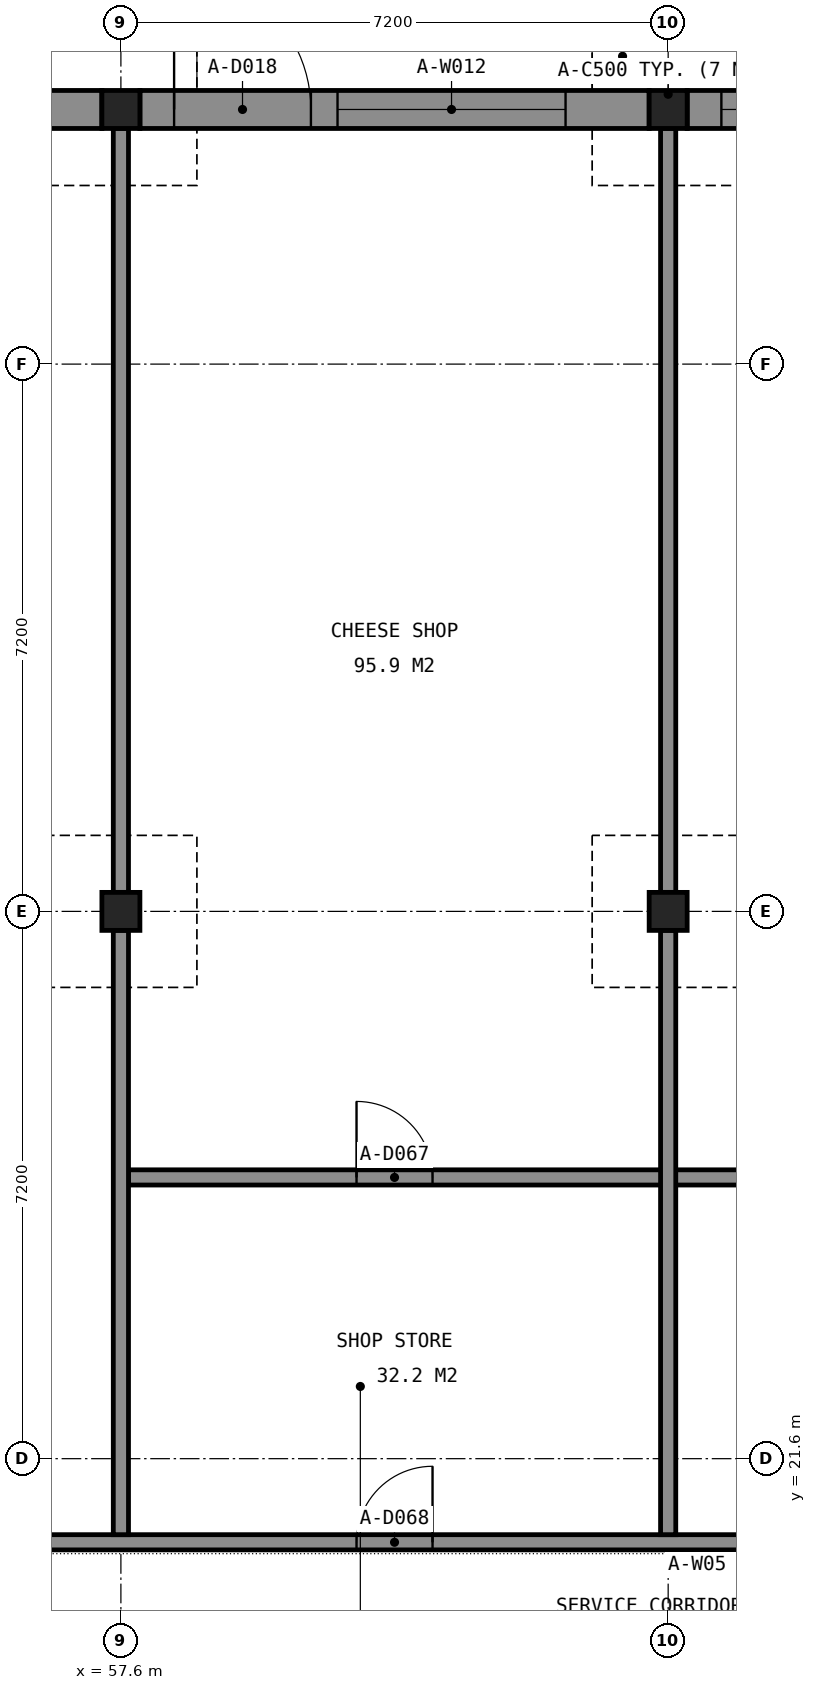
"""IFC4 building model, lengths in metres.
Left out: names, types, materials, properties, quantities, classifications, styles, units other than length and angle.
Written with IfcOpenShell. Run it as: python <this file> out.ifc"""

import sys

from ifc_helpers import new_model, si_unit, direction, frame, frame_2d, origin, origin_2d, place, context, subcontext, project, spatial, rectangle, extrude, element, fill, save


model = new_model("IFC4")
c1 = context("Model", 3, precision=1e-05, world=origin(), true_north=direction((0.0, 1.0)))
c2 = subcontext(c1, "Body", "Model", "MODEL_VIEW")
j1 = project(units=[si_unit("LENGTHUNIT", "METRE"), si_unit("PLANEANGLEUNIT", "RADIAN")], contexts=[c1])
p1 = place(None, origin())
s1 = spatial("IfcSite", under=j1, at=p1, CompositionType="ELEMENT")
p2 = place(p1, origin())
s2 = spatial("IfcBuilding", under=s1, at=p2, CompositionType="ELEMENT")
p3 = place(p2, origin())
s3 = spatial("IfcBuildingStorey", under=s2, at=p3, CompositionType="ELEMENT", Elevation=0.0)
for number, where, z_axis, x_axis in (
    (1, (57.6, 39.35, 0.0), (0.0, 0.0, 1.0), (1.0, 0.0, 0.0)),
    (2, (64.8, 39.35, 0.0), (0.0, 0.0, 1.0), (1.0, 0.0, 0.0)),
    (3, (57.6, 28.8, 0.0), (0.0, 0.0, 1.0), (1.0, 0.0, 0.0)),
    (4, (64.8, 28.8, 0.0), (0.0, 0.0, 1.0), (1.0, 0.0, 0.0)),
):
    element("IfcColumn", number, at=place(p3, frame(where, z_axis=z_axis, x_axis=x_axis)), inside=s3, PredefinedType="COLUMN", context=c2, shape_type="SweptSolid", body=[
        extrude(rectangle(XDim=0.5, YDim=0.5, at=origin_2d()), origin(), (0.0, 0.0, 1.0), 3.7),
    ])
p4 = place(p3, frame((50.9, 39.35, 0.0), z_axis=(0.0, 0.0, 1.0), x_axis=(1.0, 0.0, 0.0)))
e5 = element("IfcWall", 5, at=p4, inside=s3, PredefinedType="SOLIDWALL", context=c2, shape_type="SweptSolid", body=[
    extrude(rectangle(XDim=6.45, YDim=0.5, at=frame_2d((3.225, 0.0))), origin(), (0.0, 0.0, 1.0), 3.6),
])
p5 = place(p4, frame((0.8, 0.0, 0.0)))
e6 = element("IfcOpeningElement", 6, at=p5, cuts=e5, PredefinedType="OPENING", context=c2, shape_type="SweptSolid", body=[
    extrude(rectangle(XDim=1.2, YDim=2.1, at=frame_2d((0.6, 1.05))), frame((0.0, 0.26, 0.0), z_axis=(0.0, -1.0, 0.0), x_axis=(1.0, 0.0, 0.0)), (0.0, 0.0, 1.0), 0.52),
])
p6 = place(p3, frame((57.85, 39.35, 0.0), z_axis=(0.0, 0.0, 1.0), x_axis=(1.0, 0.0, 0.0)))
e7 = element("IfcWall", 7, at=p6, inside=s3, PredefinedType="SOLIDWALL", context=c2, shape_type="SweptSolid", body=[
    extrude(rectangle(XDim=6.7, YDim=0.5, at=frame_2d((3.35, 0.0))), origin(), (0.0, 0.0, 1.0), 3.6),
])
p7 = place(p6, frame((0.45, 0.0, 0.0)))
e8 = element("IfcOpeningElement", 8, at=p7, cuts=e7, PredefinedType="OPENING", context=c2, shape_type="SweptSolid", body=[
    extrude(rectangle(XDim=1.8, YDim=2.4, at=frame_2d((0.9, 1.2))), frame((0.0, 0.26, 0.0), z_axis=(0.0, -1.0, 0.0), x_axis=(1.0, 0.0, 0.0)), (0.0, 0.0, 1.0), 0.52),
])
p8 = place(p6, frame((2.6, 0.0, 0.6)))
e9 = element("IfcOpeningElement", 9, at=p8, cuts=e7, PredefinedType="OPENING", context=c2, shape_type="SweptSolid", body=[
    extrude(rectangle(XDim=3.0, YDim=2.4, at=frame_2d((1.5, 1.2))), frame((0.0, 0.26, 0.0), z_axis=(0.0, -1.0, 0.0), x_axis=(1.0, 0.0, 0.0)), (0.0, 0.0, 1.0), 0.52),
])
p9 = place(p3, frame((65.05, 39.35, 0.0), z_axis=(0.0, 0.0, 1.0), x_axis=(1.0, 0.0, 0.0)))
e10 = element("IfcWall", 10, at=p9, inside=s3, PredefinedType="SOLIDWALL", context=c2, shape_type="SweptSolid", body=[
    extrude(rectangle(XDim=6.7, YDim=0.5, at=frame_2d((3.35, 0.0))), origin(), (0.0, 0.0, 1.0), 3.6),
])
p10 = place(p9, frame((4.45, 0.0, 0.0)))
e11 = element("IfcOpeningElement", 11, at=p10, cuts=e10, PredefinedType="OPENING", context=c2, shape_type="SweptSolid", body=[
    extrude(rectangle(XDim=1.8, YDim=2.4, at=frame_2d((0.9, 1.2))), frame((0.0, 0.26, 0.0), z_axis=(0.0, -1.0, 0.0), x_axis=(1.0, 0.0, 0.0)), (0.0, 0.0, 1.0), 0.52),
])
p11 = place(p9, frame((0.45, 0.0, 0.6)))
e12 = element("IfcOpeningElement", 12, at=p11, cuts=e10, PredefinedType="OPENING", context=c2, shape_type="SweptSolid", body=[
    extrude(rectangle(XDim=3.0, YDim=2.4, at=frame_2d((1.5, 1.2))), frame((0.0, 0.26, 0.0), z_axis=(0.0, -1.0, 0.0), x_axis=(1.0, 0.0, 0.0)), (0.0, 0.0, 1.0), 0.52),
])
p12 = place(p3, frame((54.35, 20.5, 0.0), z_axis=(0.0, 0.0, 1.0), x_axis=(1.0, 0.0, 0.0)))
e13 = element("IfcWall", 13, at=p12, inside=s3, PredefinedType="PARTITIONING", context=c2, shape_type="SweptSolid", body=[
    extrude(rectangle(XDim=92.9, YDim=0.2, at=frame_2d((46.45, 0.0))), origin(), (0.0, 0.0, 1.0), 3.5),
])
p13 = place(p12, frame((1.1, 0.0, 0.0)))
e14 = element("IfcOpeningElement", 14, at=p13, cuts=e13, PredefinedType="OPENING", context=c2, shape_type="SweptSolid", body=[
    extrude(rectangle(XDim=0.9, YDim=2.1, at=frame_2d((0.45, 1.05))), frame((0.0, 0.11, 0.0), z_axis=(0.0, -1.0, 0.0), x_axis=(1.0, 0.0, 0.0)), (0.0, 0.0, 1.0), 0.22),
])
p14 = place(p12, frame((90.9, 0.0, 0.0)))
e15 = element("IfcOpeningElement", 15, at=p14, cuts=e13, PredefinedType="OPENING", context=c2, shape_type="SweptSolid", body=[
    extrude(rectangle(XDim=0.9, YDim=2.1, at=frame_2d((0.45, 1.05))), frame((0.0, 0.11, 0.0), z_axis=(0.0, -1.0, 0.0), x_axis=(1.0, 0.0, 0.0)), (0.0, 0.0, 1.0), 0.22),
])
p15 = place(p12, frame((6.35, 0.0, 0.0)))
e16 = element("IfcOpeningElement", 16, at=p15, cuts=e13, PredefinedType="OPENING", context=c2, shape_type="SweptSolid", body=[
    extrude(rectangle(XDim=1.0, YDim=2.1, at=frame_2d((0.5, 1.05))), frame((0.0, 0.11, 0.0), z_axis=(0.0, -1.0, 0.0), x_axis=(1.0, 0.0, 0.0)), (0.0, 0.0, 1.0), 0.22),
])
p16 = place(p12, frame((13.55, 0.0, 0.0)))
e17 = element("IfcOpeningElement", 17, at=p16, cuts=e13, PredefinedType="OPENING", context=c2, shape_type="SweptSolid", body=[
    extrude(rectangle(XDim=1.0, YDim=2.1, at=frame_2d((0.5, 1.05))), frame((0.0, 0.11, 0.0), z_axis=(0.0, -1.0, 0.0), x_axis=(1.0, 0.0, 0.0)), (0.0, 0.0, 1.0), 0.22),
])
p17 = place(p12, frame((20.75, 0.0, 0.0)))
e18 = element("IfcOpeningElement", 18, at=p17, cuts=e13, PredefinedType="OPENING", context=c2, shape_type="SweptSolid", body=[
    extrude(rectangle(XDim=1.0, YDim=2.1, at=frame_2d((0.5, 1.05))), frame((0.0, 0.11, 0.0), z_axis=(0.0, -1.0, 0.0), x_axis=(1.0, 0.0, 0.0)), (0.0, 0.0, 1.0), 0.22),
])
p18 = place(p12, frame((27.95, 0.0, 0.0)))
e19 = element("IfcOpeningElement", 19, at=p18, cuts=e13, PredefinedType="OPENING", context=c2, shape_type="SweptSolid", body=[
    extrude(rectangle(XDim=1.0, YDim=2.1, at=frame_2d((0.5, 1.05))), frame((0.0, 0.11, 0.0), z_axis=(0.0, -1.0, 0.0), x_axis=(1.0, 0.0, 0.0)), (0.0, 0.0, 1.0), 0.22),
])
p19 = place(p12, frame((35.15, 0.0, 0.0)))
e20 = element("IfcOpeningElement", 20, at=p19, cuts=e13, PredefinedType="OPENING", context=c2, shape_type="SweptSolid", body=[
    extrude(rectangle(XDim=1.0, YDim=2.1, at=frame_2d((0.5, 1.05))), frame((0.0, 0.11, 0.0), z_axis=(0.0, -1.0, 0.0), x_axis=(1.0, 0.0, 0.0)), (0.0, 0.0, 1.0), 0.22),
])
p20 = place(p12, frame((42.35, 0.0, 0.0)))
e21 = element("IfcOpeningElement", 21, at=p20, cuts=e13, PredefinedType="OPENING", context=c2, shape_type="SweptSolid", body=[
    extrude(rectangle(XDim=1.0, YDim=2.1, at=frame_2d((0.5, 1.05))), frame((0.0, 0.11, 0.0), z_axis=(0.0, -1.0, 0.0), x_axis=(1.0, 0.0, 0.0)), (0.0, 0.0, 1.0), 0.22),
])
p21 = place(p12, frame((49.55, 0.0, 0.0)))
e22 = element("IfcOpeningElement", 22, at=p21, cuts=e13, PredefinedType="OPENING", context=c2, shape_type="SweptSolid", body=[
    extrude(rectangle(XDim=1.0, YDim=2.1, at=frame_2d((0.5, 1.05))), frame((0.0, 0.11, 0.0), z_axis=(0.0, -1.0, 0.0), x_axis=(1.0, 0.0, 0.0)), (0.0, 0.0, 1.0), 0.22),
])
p22 = place(p12, frame((56.75, 0.0, 0.0)))
e23 = element("IfcOpeningElement", 23, at=p22, cuts=e13, PredefinedType="OPENING", context=c2, shape_type="SweptSolid", body=[
    extrude(rectangle(XDim=1.0, YDim=2.1, at=frame_2d((0.5, 1.05))), frame((0.0, 0.11, 0.0), z_axis=(0.0, -1.0, 0.0), x_axis=(1.0, 0.0, 0.0)), (0.0, 0.0, 1.0), 0.22),
])
p23 = place(p12, frame((63.95, 0.0, 0.0)))
e24 = element("IfcOpeningElement", 24, at=p23, cuts=e13, PredefinedType="OPENING", context=c2, shape_type="SweptSolid", body=[
    extrude(rectangle(XDim=1.0, YDim=2.1, at=frame_2d((0.5, 1.05))), frame((0.0, 0.11, 0.0), z_axis=(0.0, -1.0, 0.0), x_axis=(1.0, 0.0, 0.0)), (0.0, 0.0, 1.0), 0.22),
])
p24 = place(p12, frame((71.15, 0.0, 0.0)))
e25 = element("IfcOpeningElement", 25, at=p24, cuts=e13, PredefinedType="OPENING", context=c2, shape_type="SweptSolid", body=[
    extrude(rectangle(XDim=1.0, YDim=2.1, at=frame_2d((0.5, 1.05))), frame((0.0, 0.11, 0.0), z_axis=(0.0, -1.0, 0.0), x_axis=(1.0, 0.0, 0.0)), (0.0, 0.0, 1.0), 0.22),
])
p25 = place(p12, frame((78.35, 0.0, 0.0)))
e26 = element("IfcOpeningElement", 26, at=p25, cuts=e13, PredefinedType="OPENING", context=c2, shape_type="SweptSolid", body=[
    extrude(rectangle(XDim=1.0, YDim=2.1, at=frame_2d((0.5, 1.05))), frame((0.0, 0.11, 0.0), z_axis=(0.0, -1.0, 0.0), x_axis=(1.0, 0.0, 0.0)), (0.0, 0.0, 1.0), 0.22),
])
p26 = place(p12, frame((85.55, 0.0, 0.0)))
e27 = element("IfcOpeningElement", 27, at=p26, cuts=e13, PredefinedType="OPENING", context=c2, shape_type="SweptSolid", body=[
    extrude(rectangle(XDim=1.0, YDim=2.1, at=frame_2d((0.5, 1.05))), frame((0.0, 0.11, 0.0), z_axis=(0.0, -1.0, 0.0), x_axis=(1.0, 0.0, 0.0)), (0.0, 0.0, 1.0), 0.22),
])
p27 = place(p3, frame((57.7, 25.3, 0.0), z_axis=(0.0, 0.0, 1.0), x_axis=(1.0, 0.0, 0.0)))
e28 = element("IfcWall", 28, at=p27, inside=s3, PredefinedType="PARTITIONING", context=c2, shape_type="SweptSolid", body=[
    extrude(rectangle(XDim=86.2, YDim=0.2, at=frame_2d((43.1, 0.0))), origin(), (0.0, 0.0, 1.0), 3.5),
])
p28 = place(p27, frame((3.0, 0.0, 0.0)))
e29 = element("IfcOpeningElement", 29, at=p28, cuts=e28, PredefinedType="OPENING", context=c2, shape_type="SweptSolid", body=[
    extrude(rectangle(XDim=1.0, YDim=2.1, at=frame_2d((0.5, 1.05))), frame((0.0, 0.11, 0.0), z_axis=(0.0, -1.0, 0.0), x_axis=(1.0, 0.0, 0.0)), (0.0, 0.0, 1.0), 0.22),
])
p29 = place(p27, frame((10.2, 0.0, 0.0)))
e30 = element("IfcOpeningElement", 30, at=p29, cuts=e28, PredefinedType="OPENING", context=c2, shape_type="SweptSolid", body=[
    extrude(rectangle(XDim=1.0, YDim=2.1, at=frame_2d((0.5, 1.05))), frame((0.0, 0.11, 0.0), z_axis=(0.0, -1.0, 0.0), x_axis=(1.0, 0.0, 0.0)), (0.0, 0.0, 1.0), 0.22),
])
p30 = place(p27, frame((17.4, 0.0, 0.0)))
e31 = element("IfcOpeningElement", 31, at=p30, cuts=e28, PredefinedType="OPENING", context=c2, shape_type="SweptSolid", body=[
    extrude(rectangle(XDim=1.0, YDim=2.1, at=frame_2d((0.5, 1.05))), frame((0.0, 0.11, 0.0), z_axis=(0.0, -1.0, 0.0), x_axis=(1.0, 0.0, 0.0)), (0.0, 0.0, 1.0), 0.22),
])
p31 = place(p27, frame((24.6, 0.0, 0.0)))
e32 = element("IfcOpeningElement", 32, at=p31, cuts=e28, PredefinedType="OPENING", context=c2, shape_type="SweptSolid", body=[
    extrude(rectangle(XDim=1.0, YDim=2.1, at=frame_2d((0.5, 1.05))), frame((0.0, 0.11, 0.0), z_axis=(0.0, -1.0, 0.0), x_axis=(1.0, 0.0, 0.0)), (0.0, 0.0, 1.0), 0.22),
])
p32 = place(p27, frame((31.8, 0.0, 0.0)))
e33 = element("IfcOpeningElement", 33, at=p32, cuts=e28, PredefinedType="OPENING", context=c2, shape_type="SweptSolid", body=[
    extrude(rectangle(XDim=1.0, YDim=2.1, at=frame_2d((0.5, 1.05))), frame((0.0, 0.11, 0.0), z_axis=(0.0, -1.0, 0.0), x_axis=(1.0, 0.0, 0.0)), (0.0, 0.0, 1.0), 0.22),
])
p33 = place(p27, frame((39.0, 0.0, 0.0)))
e34 = element("IfcOpeningElement", 34, at=p33, cuts=e28, PredefinedType="OPENING", context=c2, shape_type="SweptSolid", body=[
    extrude(rectangle(XDim=1.0, YDim=2.1, at=frame_2d((0.5, 1.05))), frame((0.0, 0.11, 0.0), z_axis=(0.0, -1.0, 0.0), x_axis=(1.0, 0.0, 0.0)), (0.0, 0.0, 1.0), 0.22),
])
p34 = place(p27, frame((46.2, 0.0, 0.0)))
e35 = element("IfcOpeningElement", 35, at=p34, cuts=e28, PredefinedType="OPENING", context=c2, shape_type="SweptSolid", body=[
    extrude(rectangle(XDim=1.0, YDim=2.1, at=frame_2d((0.5, 1.05))), frame((0.0, 0.11, 0.0), z_axis=(0.0, -1.0, 0.0), x_axis=(1.0, 0.0, 0.0)), (0.0, 0.0, 1.0), 0.22),
])
p35 = place(p27, frame((53.4, 0.0, 0.0)))
e36 = element("IfcOpeningElement", 36, at=p35, cuts=e28, PredefinedType="OPENING", context=c2, shape_type="SweptSolid", body=[
    extrude(rectangle(XDim=1.0, YDim=2.1, at=frame_2d((0.5, 1.05))), frame((0.0, 0.11, 0.0), z_axis=(0.0, -1.0, 0.0), x_axis=(1.0, 0.0, 0.0)), (0.0, 0.0, 1.0), 0.22),
])
p36 = place(p27, frame((60.6, 0.0, 0.0)))
e37 = element("IfcOpeningElement", 37, at=p36, cuts=e28, PredefinedType="OPENING", context=c2, shape_type="SweptSolid", body=[
    extrude(rectangle(XDim=1.0, YDim=2.1, at=frame_2d((0.5, 1.05))), frame((0.0, 0.11, 0.0), z_axis=(0.0, -1.0, 0.0), x_axis=(1.0, 0.0, 0.0)), (0.0, 0.0, 1.0), 0.22),
])
p37 = place(p27, frame((67.8, 0.0, 0.0)))
e38 = element("IfcOpeningElement", 38, at=p37, cuts=e28, PredefinedType="OPENING", context=c2, shape_type="SweptSolid", body=[
    extrude(rectangle(XDim=1.0, YDim=2.1, at=frame_2d((0.5, 1.05))), frame((0.0, 0.11, 0.0), z_axis=(0.0, -1.0, 0.0), x_axis=(1.0, 0.0, 0.0)), (0.0, 0.0, 1.0), 0.22),
])
p38 = place(p27, frame((75.0, 0.0, 0.0)))
e39 = element("IfcOpeningElement", 39, at=p38, cuts=e28, PredefinedType="OPENING", context=c2, shape_type="SweptSolid", body=[
    extrude(rectangle(XDim=1.0, YDim=2.1, at=frame_2d((0.5, 1.05))), frame((0.0, 0.11, 0.0), z_axis=(0.0, -1.0, 0.0), x_axis=(1.0, 0.0, 0.0)), (0.0, 0.0, 1.0), 0.22),
])
p39 = place(p27, frame((84.65, 0.0, 0.0)))
e40 = element("IfcOpeningElement", 40, at=p39, cuts=e28, PredefinedType="OPENING", context=c2, shape_type="SweptSolid", body=[
    extrude(rectangle(XDim=0.9, YDim=2.1, at=frame_2d((0.45, 1.05))), frame((0.0, 0.11, 0.0), z_axis=(0.0, -1.0, 0.0), x_axis=(1.0, 0.0, 0.0)), (0.0, 0.0, 1.0), 0.22),
])
p40 = place(p3, frame((57.6, 20.6, 0.0), z_axis=(0.0, 0.0, 1.0), x_axis=(0.0, 1.0, 0.0)))
e41 = element("IfcWall", 41, at=p40, inside=s3, PredefinedType="PARTITIONING", context=c2, shape_type="SweptSolid", body=[
    extrude(rectangle(XDim=7.95, YDim=0.2, at=frame_2d((3.975, 0.0))), origin(), (0.0, 0.0, 1.0), 3.5),
])
p41 = place(p3, frame((57.6, 29.05, 0.0), z_axis=(0.0, 0.0, 1.0), x_axis=(0.0, 1.0, 0.0)))
e42 = element("IfcWall", 42, at=p41, inside=s3, PredefinedType="PARTITIONING", context=c2, shape_type="SweptSolid", body=[
    extrude(rectangle(XDim=10.05, YDim=0.2, at=frame_2d((5.025, 0.0))), origin(), (0.0, 0.0, 1.0), 3.5),
])
p42 = place(p3, frame((64.8, 20.6, 0.0), z_axis=(0.0, 0.0, 1.0), x_axis=(0.0, 1.0, 0.0)))
e43 = element("IfcWall", 43, at=p42, inside=s3, PredefinedType="PARTITIONING", context=c2, shape_type="SweptSolid", body=[
    extrude(rectangle(XDim=7.95, YDim=0.2, at=frame_2d((3.975, 0.0))), origin(), (0.0, 0.0, 1.0), 3.5),
])
p43 = place(p3, frame((64.8, 29.05, 0.0), z_axis=(0.0, 0.0, 1.0), x_axis=(0.0, 1.0, 0.0)))
e44 = element("IfcWall", 44, at=p43, inside=s3, PredefinedType="PARTITIONING", context=c2, shape_type="SweptSolid", body=[
    extrude(rectangle(XDim=10.05, YDim=0.2, at=frame_2d((5.025, 0.0))), origin(), (0.0, 0.0, 1.0), 3.5),
])
p44 = place(p7, origin())
e45 = element("IfcDoor", 45, at=p44, inside=s3, OperationType="DOUBLE_DOOR_DOUBLE_SWING", PredefinedType="DOOR", context=c2, shape_type="SweptSolid", body=[
    extrude(rectangle(XDim=1.8, YDim=2.4, at=frame_2d((0.9, 1.2))), frame((0.0, 0.025, 0.0), z_axis=(0.0, -1.0, 0.0), x_axis=(1.0, 0.0, 0.0)), (0.0, 0.0, 1.0), 0.05),
])
fill(e8, e45)
p45 = place(p8, origin())
e46 = element("IfcWindow", 46, at=p45, inside=s3, PartitioningType="SINGLE_PANEL", PredefinedType="WINDOW", context=c2, shape_type="SweptSolid", body=[
    extrude(rectangle(XDim=3.0, YDim=2.4, at=frame_2d((1.5, 1.2))), frame((0.0, 0.03, 0.0), z_axis=(0.0, -1.0, 0.0), x_axis=(1.0, 0.0, 0.0)), (0.0, 0.0, 1.0), 0.06),
])
fill(e9, e46)
p46 = place(p11, origin())
e47 = element("IfcWindow", 47, at=p46, inside=s3, PartitioningType="SINGLE_PANEL", PredefinedType="WINDOW", context=c2, shape_type="SweptSolid", body=[
    extrude(rectangle(XDim=3.0, YDim=2.4, at=frame_2d((1.5, 1.2))), frame((0.0, 0.03, 0.0), z_axis=(0.0, -1.0, 0.0), x_axis=(1.0, 0.0, 0.0)), (0.0, 0.0, 1.0), 0.06),
])
fill(e12, e47)
p47 = place(p28, origin())
e48 = element("IfcDoor", 48, at=p47, inside=s3, OperationType="SINGLE_SWING_LEFT", PredefinedType="DOOR", context=c2, shape_type="SweptSolid", body=[
    extrude(rectangle(XDim=1.0, YDim=2.1, at=frame_2d((0.5, 1.05))), frame((0.0, 0.025, 0.0), z_axis=(0.0, -1.0, 0.0), x_axis=(1.0, 0.0, 0.0)), (0.0, 0.0, 1.0), 0.05),
])
fill(e29, e48)
p48 = place(p15, origin())
e49 = element("IfcDoor", 49, at=p48, inside=s3, OperationType="SINGLE_SWING_RIGHT", PredefinedType="DOOR", context=c2, shape_type="SweptSolid", body=[
    extrude(rectangle(XDim=1.0, YDim=2.1, at=frame_2d((0.5, 1.05))), frame((0.0, 0.025, 0.0), z_axis=(0.0, -1.0, 0.0), x_axis=(1.0, 0.0, 0.0)), (0.0, 0.0, 1.0), 0.05),
])
fill(e16, e49)
save(model, sys.argv[1])
